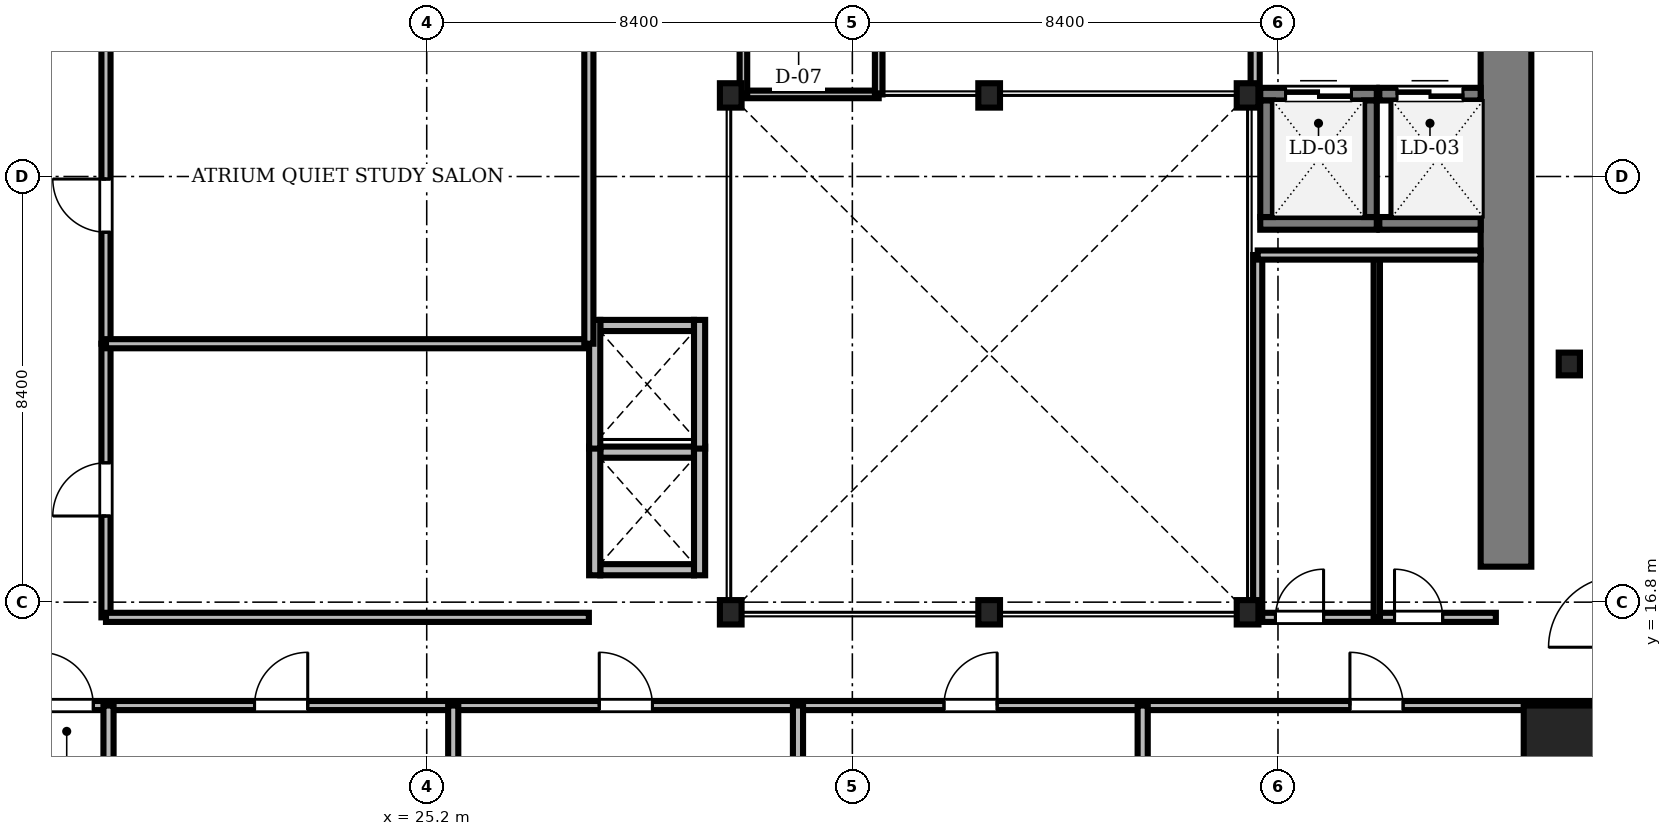
"""IFC4 building model, lengths in metres.
Left out: names, types, materials, properties, quantities, classifications, styles, units other than length and angle.
Written with IfcOpenShell. Run it as: python <this file> out.ifc"""

import sys

from ifc_helpers import new_model, si_unit, direction, frame, frame_2d, origin, origin_2d, place, context, subcontext, project, spatial, rectangle, i_section, extrude, source, transform, mapped, element, fill, save


model = new_model("IFC4")
c1 = context("Model", 3, precision=1e-05, world=origin(), true_north=direction((0.0, 1.0)))
c2 = subcontext(c1, "Body", "Model", "MODEL_VIEW")
j1 = project(units=[si_unit("LENGTHUNIT", "METRE"), si_unit("PLANEANGLEUNIT", "RADIAN")], contexts=[c1])
p1 = place(None, origin())
s1 = spatial("IfcSite", under=j1, at=p1, CompositionType="ELEMENT")
p2 = place(p1, origin())
s2 = spatial("IfcBuilding", under=s1, at=p2, CompositionType="ELEMENT")
p3 = place(p2, frame((0.0, 0.0, 75.05)))
s3 = spatial("IfcBuildingStorey", under=s2, at=p3, CompositionType="ELEMENT", Elevation=75.05)
m1 = source(origin(), c2, "Body", "SweptSolid", [
    extrude(rectangle(XDim=13.15, YDim=1.0, at=frame_2d((6.575, 0.0))), origin(), (0.0, 0.0, 1.0), 3.41),
])
p4 = place(p3, frame((46.5, 17.5, 0.0), z_axis=(0.0, 0.0, 1.0), x_axis=(0.0, 1.0, 0.0)))
e1 = element("IfcWall", 1, at=p4, inside=s3, PredefinedType="SHEAR", context=c2, shape_type="MappedRepresentation", body=[
    mapped(m1, transform((0.0, 0.0, 0.0), scale=1.0)),
])
m2 = source(origin(), c2, "Body", "SweptSolid", [
    extrude(i_section(OverallWidth=0.428, OverallDepth=0.481, WebThickness=0.04, FlangeThickness=0.063, FilletRadius=0.015, at=origin_2d()), origin(), (0.0, 0.0, 1.0), 3.41),
])
for number, where, z_axis, x_axis in (
    (2, (31.2, 16.6, 0.0), (0.0, 0.0, 1.0), (1.0, 0.0, 0.0)),
    (3, (36.3, 16.6, 0.0), (0.0, 0.0, 1.0), (1.0, 0.0, 0.0)),
    (4, (41.4, 16.6, 0.0), (0.0, 0.0, 1.0), (1.0, 0.0, 0.0)),
    (5, (41.4, 26.8, 0.0), (0.0, 0.0, 1.0), (1.0, 0.0, 0.0)),
    (6, (36.3, 26.8, 0.0), (0.0, 0.0, 1.0), (1.0, 0.0, 0.0)),
    (7, (31.2, 26.8, 0.0), (0.0, 0.0, 1.0), (1.0, 0.0, 0.0)),
):
    element("IfcColumn", number, at=place(p3, frame(where, z_axis=z_axis, x_axis=x_axis)), inside=s3, PredefinedType="COLUMN", context=c2, shape_type="MappedRepresentation", body=[
        mapped(m2, transform((0.0, 0.0, 0.0), scale=1.0)),
    ])
m3 = source(origin(), c2, "Body", "SweptSolid", [
    extrude(rectangle(XDim=1.8, YDim=1.8, at=origin_2d()), origin(), (0.0, 0.0, 1.0), 3.41),
])
p5 = place(p3, frame((47.75, 13.86, 0.0), z_axis=(0.0, 0.0, 1.0), x_axis=(1.0, 0.0, 0.0)))
e8 = element("IfcColumn", 8, at=p5, inside=s3, PredefinedType="COLUMN", context=c2, shape_type="MappedRepresentation", body=[
    mapped(m3, transform((0.0, 0.0, 0.0), scale=1.0)),
])
m4 = source(origin(), c2, "Body", "SweptSolid", [
    extrude(i_section(OverallWidth=0.419, OverallDepth=0.449, WebThickness=0.031, FlangeThickness=0.048, FilletRadius=0.015, at=origin_2d()), origin(), (0.0, 0.0, 1.0), 3.41),
])
p6 = place(p3, frame((47.75, 21.5, 0.0), z_axis=(0.0, 0.0, 1.0), x_axis=(1.0, 0.0, 0.0)))
e9 = element("IfcColumn", 9, at=p6, inside=s3, PredefinedType="COLUMN", context=c2, shape_type="MappedRepresentation", body=[
    mapped(m4, transform((0.0, 0.0, 0.0), scale=1.0)),
])
m5 = source(origin(), c2, "Body", "SweptSolid", [
    extrude(rectangle(XDim=1.85, YDim=0.22, at=frame_2d((0.925, 0.0))), origin(), (0.0, 0.0, 1.0), 3.41),
])
for number, where, z_axis, x_axis in (
    (10, (28.625, 17.44, 0.0), (0.0, 0.0, 1.0), (1.0, 0.0, 0.0)),
    (11, (28.625, 19.76, 0.0), (0.0, 0.0, 1.0), (1.0, 0.0, 0.0)),
):
    element("IfcWall", number, at=place(p3, frame(where, z_axis=z_axis, x_axis=x_axis)), inside=s3, PredefinedType="SOLIDWALL", context=c2, shape_type="MappedRepresentation", body=[
        mapped(m5, transform((0.0, 0.0, 0.0), scale=1.0)),
    ])
m6 = source(origin(), c2, "Body", "SweptSolid", [
    extrude(rectangle(XDim=2.54, YDim=0.22, at=frame_2d((1.27, 0.0))), origin(), (0.0, 0.0, 1.0), 3.41),
])
for number, where, z_axis, x_axis in (
    (12, (28.515, 17.33, 0.0), (0.0, 0.0, 1.0), (0.0, 1.0, 0.0)),
    (13, (30.585, 17.33, 0.0), (0.0, 0.0, 1.0), (0.0, 1.0, 0.0)),
):
    element("IfcWall", number, at=place(p3, frame(where, z_axis=z_axis, x_axis=x_axis)), inside=s3, PredefinedType="SOLIDWALL", context=c2, shape_type="MappedRepresentation", body=[
        mapped(m6, transform((0.0, 0.0, 0.0), scale=1.0)),
    ])
p7 = place(p3, frame((28.625, 22.26, 0.0), z_axis=(0.0, 0.0, 1.0), x_axis=(1.0, 0.0, 0.0)))
e14 = element("IfcWall", 14, at=p7, inside=s3, PredefinedType="SOLIDWALL", context=c2, shape_type="MappedRepresentation", body=[
    mapped(m5, transform((0.0, 0.0, 0.0), scale=1.0)),
])
for number, where, z_axis, x_axis in (
    (15, (28.515, 19.83, 0.0), (0.0, 0.0, 1.0), (0.0, 1.0, 0.0)),
    (16, (30.585, 19.83, 0.0), (0.0, 0.0, 1.0), (0.0, 1.0, 0.0)),
):
    element("IfcWall", number, at=place(p3, frame(where, z_axis=z_axis, x_axis=x_axis)), inside=s3, PredefinedType="SOLIDWALL", context=c2, shape_type="MappedRepresentation", body=[
        mapped(m6, transform((0.0, 0.0, 0.0), scale=1.0)),
    ])
m7 = source(origin(), c2, "Body", "SweptSolid", [
    extrude(rectangle(XDim=2.3, YDim=0.25, at=frame_2d((1.15, 0.0))), origin(), (0.0, 0.0, 1.0), 3.41),
])
p8 = place(p3, frame((41.65, 24.275, 0.0), z_axis=(0.0, 0.0, 1.0), x_axis=(1.0, 0.0, 0.0)))
e17 = element("IfcWall", 17, at=p8, inside=s3, PredefinedType="SOLIDWALL", context=c2, shape_type="MappedRepresentation", body=[
    mapped(m7, transform((0.0, 0.0, 0.0), scale=1.0)),
])
p9 = place(p3, frame((41.65, 26.825, 0.0), z_axis=(0.0, 0.0, 1.0), x_axis=(1.0, 0.0, 0.0)))
e18 = element("IfcWall", 18, at=p9, inside=s3, PredefinedType="SOLIDWALL", context=c2, shape_type="MappedRepresentation", body=[
    mapped(m7, transform((0.0, 0.0, 0.0), scale=1.0)),
])
m8 = source(origin(), c2, "Body", "SweptSolid", [
    extrude(rectangle(XDim=1.3, YDim=2.3, at=frame_2d((0.65, 1.15))), frame((0.0, 0.135, 0.0), z_axis=(0.0, -1.0, 0.0), x_axis=(1.0, 0.0, 0.0)), (0.0, 0.0, 1.0), 0.27),
])
p10 = place(p9, frame((0.5, 0.0, 0.0)))
e19 = element("IfcOpeningElement", 19, at=p10, cuts=e18, PredefinedType="OPENING", context=c2, shape_type="MappedRepresentation", body=[
    mapped(m8, transform((0.0, 0.0, 0.0), scale=1.0)),
])
for number, where, z_axis, x_axis in (
    (20, (41.775, 24.4, 0.0), (0.0, 0.0, 1.0), (0.0, 1.0, 0.0)),
    (21, (43.825, 24.4, 0.0), (0.0, 0.0, 1.0), (0.0, 1.0, 0.0)),
):
    element("IfcWall", number, at=place(p3, frame(where, z_axis=z_axis, x_axis=x_axis)), inside=s3, PredefinedType="SOLIDWALL", context=c2, shape_type="MappedRepresentation", body=[
        mapped(m7, transform((0.0, 0.0, 0.0), scale=1.0)),
    ])
m9 = source(origin(), c2, "Body", "SweptSolid", [
    extrude(rectangle(XDim=2.0, YDim=0.25, at=frame_2d((1.0, 0.0))), origin(), (0.0, 0.0, 1.0), 3.41),
])
p11 = place(p3, frame((44.0, 24.275, 0.0), z_axis=(0.0, 0.0, 1.0), x_axis=(1.0, 0.0, 0.0)))
e22 = element("IfcWall", 22, at=p11, inside=s3, PredefinedType="SOLIDWALL", context=c2, shape_type="MappedRepresentation", body=[
    mapped(m9, transform((0.0, 0.0, 0.0), scale=1.0)),
])
p12 = place(p3, frame((44.0, 26.825, 0.0), z_axis=(0.0, 0.0, 1.0), x_axis=(1.0, 0.0, 0.0)))
e23 = element("IfcWall", 23, at=p12, inside=s3, PredefinedType="SOLIDWALL", context=c2, shape_type="MappedRepresentation", body=[
    mapped(m9, transform((0.0, 0.0, 0.0), scale=1.0)),
])
p13 = place(p12, frame((0.35, 0.0, 0.0)))
e24 = element("IfcOpeningElement", 24, at=p13, cuts=e23, PredefinedType="OPENING", context=c2, shape_type="MappedRepresentation", body=[
    mapped(m8, transform((0.0, 0.0, 0.0), scale=1.0)),
])
m10 = source(origin(), c2, "Body", "SweptSolid", [
    extrude(rectangle(XDim=46.156, YDim=0.18, at=frame_2d((23.078, 0.0))), origin(), (0.0, 0.0, 1.0), 2.652),
])
p14 = place(p3, frame((2.422, 14.76, 0.0), z_axis=(0.0, 0.0, 1.0), x_axis=(1.0, 0.0, 0.0)))
e25 = element("IfcWall", 25, at=p14, inside=s3, PredefinedType="PARTITIONING", context=c2, shape_type="MappedRepresentation", body=[
    mapped(m10, transform((0.0, 0.0, 0.0), scale=1.0)),
])
m11 = source(origin(), c2, "Body", "SweptSolid", [
    extrude(rectangle(XDim=1.05, YDim=2.2, at=frame_2d((0.525, 1.1))), frame((0.0, 0.1, 0.0), z_axis=(0.0, -1.0, 0.0), x_axis=(1.0, 0.0, 0.0)), (0.0, 0.0, 1.0), 0.2),
])
p15 = place(p14, frame((15.148, 0.0, 0.0)))
e26 = element("IfcOpeningElement", 26, at=p15, cuts=e25, PredefinedType="OPENING", context=c2, shape_type="MappedRepresentation", body=[
    mapped(m11, transform((0.0, 0.0, 0.0), scale=1.0)),
])
p16 = place(p14, frame((19.38, 0.0, 0.0)))
e27 = element("IfcOpeningElement", 27, at=p16, cuts=e25, PredefinedType="OPENING", context=c2, shape_type="MappedRepresentation", body=[
    mapped(m11, transform((0.0, 0.0, 0.0), scale=1.0)),
])
p17 = place(p14, frame((26.183, 0.0, 0.0)))
e28 = element("IfcOpeningElement", 28, at=p17, cuts=e25, PredefinedType="OPENING", context=c2, shape_type="MappedRepresentation", body=[
    mapped(m11, transform((0.0, 0.0, 0.0), scale=1.0)),
])
p18 = place(p14, frame((32.986, 0.0, 0.0)))
e29 = element("IfcOpeningElement", 29, at=p18, cuts=e25, PredefinedType="OPENING", context=c2, shape_type="MappedRepresentation", body=[
    mapped(m11, transform((0.0, 0.0, 0.0), scale=1.0)),
])
p19 = place(p14, frame((40.998, 0.0, 0.0)))
e30 = element("IfcOpeningElement", 30, at=p19, cuts=e25, PredefinedType="OPENING", context=c2, shape_type="MappedRepresentation", body=[
    mapped(m11, transform((0.0, 0.0, 0.0), scale=1.0)),
])
m12 = source(origin(), c2, "Body", "SweptSolid", [
    extrude(rectangle(XDim=6.54, YDim=0.18, at=frame_2d((3.27, 0.0))), origin(), (0.0, 0.0, 1.0), 2.802),
])
p20 = place(p3, frame((18.87, 21.9, 0.0), z_axis=(0.0, 0.0, 1.0), x_axis=(0.0, 1.0, 0.0)))
e31 = element("IfcWall", 31, at=p20, inside=s3, PredefinedType="PARTITIONING", context=c2, shape_type="MappedRepresentation", body=[
    mapped(m12, transform((0.0, 0.0, 0.0), scale=1.0)),
])
p21 = place(p20, frame((2.2, 0.0, 0.0)))
e32 = element("IfcOpeningElement", 32, at=p21, cuts=e31, PredefinedType="OPENING", context=c2, shape_type="MappedRepresentation", body=[
    mapped(m11, transform((0.0, 0.0, 0.0), scale=1.0)),
])
m13 = source(origin(), c2, "Body", "SweptSolid", [
    extrude(rectangle(XDim=5.4, YDim=0.18, at=frame_2d((2.7, 0.0))), origin(), (0.0, 0.0, 1.0), 2.802),
])
p22 = place(p3, frame((18.87, 16.5, 0.0), z_axis=(0.0, 0.0, 1.0), x_axis=(0.0, 1.0, 0.0)))
e33 = element("IfcWall", 33, at=p22, inside=s3, PredefinedType="PARTITIONING", context=c2, shape_type="MappedRepresentation", body=[
    mapped(m13, transform((0.0, 0.0, 0.0), scale=1.0)),
])
p23 = place(p22, frame((2.0, 0.0, 0.0)))
e34 = element("IfcOpeningElement", 34, at=p23, cuts=e33, PredefinedType="OPENING", context=c2, shape_type="MappedRepresentation", body=[
    mapped(m11, transform((0.0, 0.0, 0.0), scale=1.0)),
])
m14 = source(origin(), c2, "Body", "SweptSolid", [
    extrude(rectangle(XDim=4.7, YDim=0.18, at=frame_2d((2.35, 0.0))), origin(), (0.0, 0.0, 1.0), 2.802),
])
p24 = place(p3, frame((41.6, 16.5, 0.0), z_axis=(0.0, 0.0, 1.0), x_axis=(1.0, 0.0, 0.0)))
e35 = element("IfcWall", 35, at=p24, inside=s3, PredefinedType="PARTITIONING", context=c2, shape_type="MappedRepresentation", body=[
    mapped(m14, transform((0.0, 0.0, 0.0), scale=1.0)),
])
m15 = source(origin(), c2, "Body", "SweptSolid", [
    extrude(rectangle(XDim=0.95, YDim=2.15, at=frame_2d((0.475, 1.075))), frame((0.0, 0.1, 0.0), z_axis=(0.0, -1.0, 0.0), x_axis=(1.0, 0.0, 0.0)), (0.0, 0.0, 1.0), 0.2),
])
p25 = place(p24, frame((0.35, 0.0, 0.0)))
e36 = element("IfcOpeningElement", 36, at=p25, cuts=e35, PredefinedType="OPENING", context=c2, shape_type="MappedRepresentation", body=[
    mapped(m15, transform((0.0, 0.0, 0.0), scale=1.0)),
])
p26 = place(p24, frame((2.7, 0.0, 0.0)))
e37 = element("IfcOpeningElement", 37, at=p26, cuts=e35, PredefinedType="OPENING", context=c2, shape_type="MappedRepresentation", body=[
    mapped(m15, transform((0.0, 0.0, 0.0), scale=1.0)),
])
m16 = source(origin(), c2, "Body", "SweptSolid", [
    extrude(rectangle(XDim=12.638, YDim=0.2, at=frame_2d((6.319, 0.0))), origin(), (0.0, 0.0, 1.0), 2.652),
])
p27 = place(p3, frame((18.92, 2.122, 0.0), z_axis=(0.0, 0.0, 1.0), x_axis=(0.0, 1.0, 0.0)))
e38 = element("IfcWall", 38, at=p27, inside=s3, PredefinedType="PARTITIONING", context=c2, shape_type="MappedRepresentation", body=[
    mapped(m16, transform((0.0, 0.0, 0.0), scale=1.0)),
])
m17 = source(origin(), c2, "Body", "SweptSolid", [
    extrude(rectangle(XDim=12.83, YDim=0.2, at=frame_2d((6.415, 0.0))), origin(), (0.0, 0.0, 1.0), 2.652),
])
p28 = place(p3, frame((25.723, 1.93, 0.0), z_axis=(0.0, 0.0, 1.0), x_axis=(0.0, 1.0, 0.0)))
e39 = element("IfcWall", 39, at=p28, inside=s3, PredefinedType="PARTITIONING", context=c2, shape_type="MappedRepresentation", body=[
    mapped(m17, transform((0.0, 0.0, 0.0), scale=1.0)),
])
for number, where, z_axis, x_axis in (
    (40, (32.527, 2.122, 0.0), (0.0, 0.0, 1.0), (0.0, 1.0, 0.0)),
    (41, (39.33, 2.122, 0.0), (0.0, 0.0, 1.0), (0.0, 1.0, 0.0)),
):
    element("IfcWall", number, at=place(p3, frame(where, z_axis=z_axis, x_axis=x_axis)), inside=s3, PredefinedType="PARTITIONING", context=c2, shape_type="MappedRepresentation", body=[
        mapped(m16, transform((0.0, 0.0, 0.0), scale=1.0)),
    ])
m18 = source(origin(), c2, "Body", "SweptSolid", [
    extrude(rectangle(XDim=9.53, YDim=0.18, at=frame_2d((4.765, 0.0))), origin(), (0.0, 0.0, 1.0), 2.802),
])
p29 = place(p3, frame((18.87, 16.5, 0.0), z_axis=(0.0, 0.0, 1.0), x_axis=(1.0, 0.0, 0.0)))
e42 = element("IfcWall", 42, at=p29, inside=s3, PredefinedType="PARTITIONING", context=c2, shape_type="MappedRepresentation", body=[
    mapped(m18, transform((0.0, 0.0, 0.0), scale=1.0)),
])
m19 = source(origin(), c2, "Body", "SweptSolid", [
    extrude(rectangle(XDim=9.53, YDim=0.18, at=frame_2d((4.765, 0.0))), origin(), (0.0, 0.0, 1.0), 3.41),
])
p30 = place(p3, frame((18.87, 21.9, 0.0), z_axis=(0.0, 0.0, 1.0), x_axis=(1.0, 0.0, 0.0)))
e43 = element("IfcWall", 43, at=p30, inside=s3, PredefinedType="PARTITIONING", context=c2, shape_type="MappedRepresentation", body=[
    mapped(m19, transform((0.0, 0.0, 0.0), scale=1.0)),
])
m20 = source(origin(), c2, "Body", "SweptSolid", [
    extrude(rectangle(XDim=7.15, YDim=0.18, at=frame_2d((3.575, 0.0))), origin(), (0.0, 0.0, 1.0), 2.802),
])
p31 = place(p3, frame((41.6, 16.5, 0.0), z_axis=(0.0, 0.0, 1.0), x_axis=(0.0, 1.0, 0.0)))
e44 = element("IfcWall", 44, at=p31, inside=s3, PredefinedType="PARTITIONING", context=c2, shape_type="MappedRepresentation", body=[
    mapped(m20, transform((0.0, 0.0, 0.0), scale=1.0)),
])
m21 = source(origin(), c2, "Body", "SweptSolid", [
    extrude(rectangle(XDim=7.15, YDim=0.125, at=frame_2d((3.575, 0.0))), origin(), (0.0, 0.0, 1.0), 2.802),
])
p32 = place(p3, frame((43.95, 16.5, 0.0), z_axis=(0.0, 0.0, 1.0), x_axis=(0.0, 1.0, 0.0)))
e45 = element("IfcWall", 45, at=p32, inside=s3, PredefinedType="PARTITIONING", context=c2, shape_type="MappedRepresentation", body=[
    mapped(m21, transform((0.0, 0.0, 0.0), scale=1.0)),
])
p33 = place(p3, frame((28.4, 21.9, 0.0), z_axis=(0.0, 0.0, 1.0), x_axis=(0.0, 1.0, 0.0)))
e46 = element("IfcWall", 46, at=p33, inside=s3, PredefinedType="PARTITIONING", context=c2, shape_type="MappedRepresentation", body=[
    mapped(m12, transform((0.0, 0.0, 0.0), scale=1.0)),
])
m22 = source(origin(), c2, "Body", "SweptSolid", [
    extrude(rectangle(XDim=4.398, YDim=0.18, at=frame_2d((2.199, 0.0))), origin(), (0.0, 0.0, 1.0), 3.41),
])
p34 = place(p3, frame((41.6, 23.65, 0.0), z_axis=(0.0, 0.0, 1.0), x_axis=(1.0, 0.0, 0.0)))
e47 = element("IfcWall", 47, at=p34, inside=s3, PredefinedType="PARTITIONING", context=c2, shape_type="MappedRepresentation", body=[
    mapped(m22, transform((0.0, 0.0, 0.0), scale=1.0)),
])
m23 = source(origin(), c2, "Body", "SweptSolid", [
    extrude(rectangle(XDim=2.67, YDim=0.15, at=frame_2d((1.335, 0.0))), origin(), (0.0, 0.0, 1.0), 2.952),
])
p35 = place(p3, frame((31.45, 26.82, 0.0), z_axis=(0.0, 0.0, 1.0), x_axis=(1.0, 0.0, 0.0)))
e48 = element("IfcWall", 48, at=p35, inside=s3, PredefinedType="PARTITIONING", context=c2, shape_type="MappedRepresentation", body=[
    mapped(m23, transform((0.0, 0.0, 0.0), scale=1.0)),
])
m24 = source(origin(), c2, "Body", "SweptSolid", [
    extrude(rectangle(XDim=2.35, YDim=0.18, at=frame_2d((1.175, 0.0))), origin(), (0.0, 0.0, 1.0), 2.802),
])
p36 = place(p3, frame((41.55, 26.8, 0.0), z_axis=(0.0, 0.0, 1.0), x_axis=(0.0, 1.0, 0.0)))
e49 = element("IfcWall", 49, at=p36, inside=s3, PredefinedType="PARTITIONING", context=c2, shape_type="MappedRepresentation", body=[
    mapped(m24, transform((0.0, 0.0, 0.0), scale=1.0)),
])
m25 = source(origin(), c2, "Body", "SweptSolid", [
    extrude(rectangle(XDim=1.6, YDim=0.15, at=frame_2d((0.8, 0.0))), origin(), (0.0, 0.0, 1.0), 2.952),
])
for number, where, z_axis, x_axis in (
    (50, (31.45, 26.82, 0.0), (0.0, 0.0, 1.0), (0.0, 1.0, 0.0)),
    (51, (34.12, 26.82, 0.0), (0.0, 0.0, 1.0), (0.0, 1.0, 0.0)),
):
    element("IfcWall", number, at=place(p3, frame(where, z_axis=z_axis, x_axis=x_axis)), inside=s3, PredefinedType="PARTITIONING", context=c2, shape_type="MappedRepresentation", body=[
        mapped(m25, transform((0.0, 0.0, 0.0), scale=1.0)),
    ])
m26 = source(origin(), c2, "Body", "SweptSolid", [
    extrude(rectangle(XDim=1.3, YDim=2.3, at=frame_2d((0.65, 1.15))), frame((0.0, 0.025, 0.0), z_axis=(0.0, -1.0, 0.0), x_axis=(1.0, 0.0, 0.0)), (0.0, 0.0, 1.0), 0.05),
])
p37 = place(p10, origin())
e52 = element("IfcDoor", 52, at=p37, inside=s3, OperationType="DOUBLE_DOOR_SLIDING", PredefinedType="DOOR", context=c2, shape_type="MappedRepresentation", body=[
    mapped(m26, transform((0.0, 0.0, 0.0), scale=1.0)),
])
fill(e19, e52)
p38 = place(p13, origin())
e53 = element("IfcDoor", 53, at=p38, inside=s3, OperationType="DOUBLE_DOOR_SLIDING", PredefinedType="DOOR", context=c2, shape_type="MappedRepresentation", body=[
    mapped(m26, transform((0.0, 0.0, 0.0), scale=1.0)),
])
fill(e24, e53)
m27 = source(origin(), c2, "Body", "SweptSolid", [
    extrude(rectangle(XDim=1.05, YDim=2.2, at=frame_2d((0.525, 1.1))), frame((0.0, 0.025, 0.0), z_axis=(0.0, -1.0, 0.0), x_axis=(1.0, 0.0, 0.0)), (0.0, 0.0, 1.0), 0.05),
])
p39 = place(p15, origin())
e54 = element("IfcDoor", 54, at=p39, inside=s3, OperationType="SINGLE_SWING_LEFT", PredefinedType="DOOR", context=c2, shape_type="MappedRepresentation", body=[
    mapped(m27, transform((0.0, 0.0, 0.0), scale=1.0)),
])
fill(e26, e54)
p40 = place(p16, origin())
e55 = element("IfcDoor", 55, at=p40, inside=s3, OperationType="SINGLE_SWING_RIGHT", PredefinedType="DOOR", context=c2, shape_type="MappedRepresentation", body=[
    mapped(m27, transform((0.0, 0.0, 0.0), scale=1.0)),
])
fill(e27, e55)
p41 = place(p17, origin())
e56 = element("IfcDoor", 56, at=p41, inside=s3, OperationType="SINGLE_SWING_LEFT", PredefinedType="DOOR", context=c2, shape_type="MappedRepresentation", body=[
    mapped(m27, transform((0.0, 0.0, 0.0), scale=1.0)),
])
fill(e28, e56)
p42 = place(p18, origin())
e57 = element("IfcDoor", 57, at=p42, inside=s3, OperationType="SINGLE_SWING_RIGHT", PredefinedType="DOOR", context=c2, shape_type="MappedRepresentation", body=[
    mapped(m27, transform((0.0, 0.0, 0.0), scale=1.0)),
])
fill(e29, e57)
p43 = place(p19, origin())
e58 = element("IfcDoor", 58, at=p43, inside=s3, OperationType="SINGLE_SWING_LEFT", PredefinedType="DOOR", context=c2, shape_type="MappedRepresentation", body=[
    mapped(m27, transform((0.0, 0.0, 0.0), scale=1.0)),
])
fill(e30, e58)
p44 = place(p21, origin())
e59 = element("IfcDoor", 59, at=p44, inside=s3, OperationType="SINGLE_SWING_RIGHT", PredefinedType="DOOR", context=c2, shape_type="MappedRepresentation", body=[
    mapped(m27, transform((0.0, 0.0, 0.0), scale=1.0)),
])
fill(e32, e59)
p45 = place(p23, origin())
e60 = element("IfcDoor", 60, at=p45, inside=s3, OperationType="SINGLE_SWING_LEFT", PredefinedType="DOOR", context=c2, shape_type="MappedRepresentation", body=[
    mapped(m27, transform((0.0, 0.0, 0.0), scale=1.0)),
])
fill(e34, e60)
m28 = source(origin(), c2, "Body", "SweptSolid", [
    extrude(rectangle(XDim=0.95, YDim=2.15, at=frame_2d((0.475, 1.075))), frame((0.0, 0.025, 0.0), z_axis=(0.0, -1.0, 0.0), x_axis=(1.0, 0.0, 0.0)), (0.0, 0.0, 1.0), 0.05),
])
p46 = place(p25, origin())
e61 = element("IfcDoor", 61, at=p46, inside=s3, OperationType="SINGLE_SWING_RIGHT", PredefinedType="DOOR", context=c2, shape_type="MappedRepresentation", body=[
    mapped(m28, transform((0.0, 0.0, 0.0), scale=1.0)),
])
fill(e36, e61)
p47 = place(p26, origin())
e62 = element("IfcDoor", 62, at=p47, inside=s3, OperationType="SINGLE_SWING_LEFT", PredefinedType="DOOR", context=c2, shape_type="MappedRepresentation", body=[
    mapped(m28, transform((0.0, 0.0, 0.0), scale=1.0)),
])
fill(e37, e62)
save(model, sys.argv[1])
